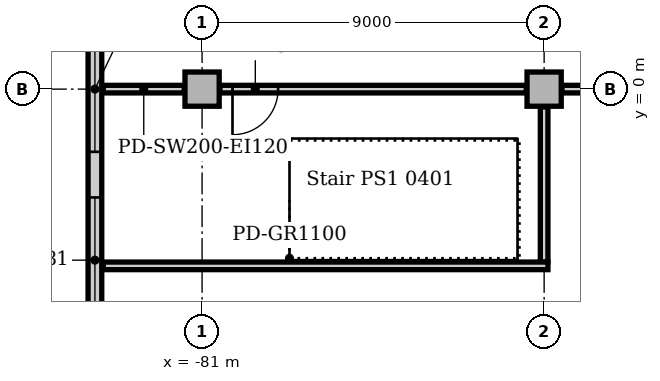
"""IFC4 building model, lengths in metres.
Left out: names, types, materials, properties, quantities, classifications, styles, units other than length and angle.
Written with IfcOpenShell. Run it as: python <this file> out.ifc"""

import sys

from ifc_helpers import new_model, si_unit, direction, frame, frame_2d, origin, origin_2d, place, context, subcontext, project, spatial, rectangle, extrude, element, fill, save


model = new_model("IFC4")
c1 = context("Model", 3, precision=1e-05, world=origin(), true_north=direction((0.0, 1.0)))
c2 = subcontext(c1, "Body", "Model", "MODEL_VIEW")
j1 = project(units=[si_unit("LENGTHUNIT", "METRE"), si_unit("PLANEANGLEUNIT", "RADIAN")], contexts=[c1])
p1 = place(None, origin())
s1 = spatial("IfcSite", under=j1, at=p1, CompositionType="ELEMENT")
p2 = place(p1, origin())
s2 = spatial("IfcBuilding", under=s1, at=p2, CompositionType="ELEMENT")
p3 = place(p2, frame((0.0, 0.0, 21.0)))
s3 = spatial("IfcBuildingStorey", under=s2, at=p3, CompositionType="ELEMENT", Elevation=21.0)
for number, where, z_axis, x_axis in (
    (1, (-81.0, 0.0, 0.0), (0.0, 0.0, 1.0), (1.0, 0.0, 0.0)),
    (2, (-72.0, 0.0, 0.0), (0.0, 0.0, 1.0), (1.0, 0.0, 0.0)),
):
    element("IfcColumn", number, at=place(p3, frame(where, z_axis=z_axis, x_axis=x_axis)), inside=s3, PredefinedType="COLUMN", context=c2, shape_type="SweptSolid", body=[
        extrude(rectangle(XDim=0.9, YDim=0.9, at=origin_2d()), origin(), (0.0, 0.0, 1.0), 4.7),
    ])
p4 = place(p3, frame((-83.82, 54.0, 0.0), z_axis=(0.0, 0.0, 1.0), x_axis=(0.0, -1.0, 0.0)))
e3 = element("IfcWall", 3, at=p4, inside=s3, PredefinedType="STANDARD", context=c2, shape_type="SweptSolid", body=[
    extrude(rectangle(XDim=63.0, YDim=0.36, at=frame_2d((31.5, 0.0))), origin(), (0.0, 0.0, 1.0), 4.85),
])
p5 = place(p4, frame((2.85, 0.0, 0.9)))
e4 = element("IfcOpeningElement", 4, at=p5, cuts=e3, PredefinedType="OPENING", context=c2, shape_type="SweptSolid", body=[
    extrude(rectangle(XDim=3.3, YDim=2.4, at=frame_2d((1.65, 1.2))), frame((0.0, 0.19, 0.0), z_axis=(0.0, -1.0, 0.0), x_axis=(1.0, 0.0, 0.0)), (0.0, 0.0, 1.0), 0.38),
])
p6 = place(p4, frame((7.35, 0.0, 0.9)))
e5 = element("IfcOpeningElement", 5, at=p6, cuts=e3, PredefinedType="OPENING", context=c2, shape_type="SweptSolid", body=[
    extrude(rectangle(XDim=3.3, YDim=2.4, at=frame_2d((1.65, 1.2))), frame((0.0, 0.19, 0.0), z_axis=(0.0, -1.0, 0.0), x_axis=(1.0, 0.0, 0.0)), (0.0, 0.0, 1.0), 0.38),
])
p7 = place(p4, frame((11.85, 0.0, 0.9)))
e6 = element("IfcOpeningElement", 6, at=p7, cuts=e3, PredefinedType="OPENING", context=c2, shape_type="SweptSolid", body=[
    extrude(rectangle(XDim=3.3, YDim=2.4, at=frame_2d((1.65, 1.2))), frame((0.0, 0.19, 0.0), z_axis=(0.0, -1.0, 0.0), x_axis=(1.0, 0.0, 0.0)), (0.0, 0.0, 1.0), 0.38),
])
p8 = place(p4, frame((16.35, 0.0, 0.9)))
e7 = element("IfcOpeningElement", 7, at=p8, cuts=e3, PredefinedType="OPENING", context=c2, shape_type="SweptSolid", body=[
    extrude(rectangle(XDim=3.3, YDim=2.4, at=frame_2d((1.65, 1.2))), frame((0.0, 0.19, 0.0), z_axis=(0.0, -1.0, 0.0), x_axis=(1.0, 0.0, 0.0)), (0.0, 0.0, 1.0), 0.38),
])
p9 = place(p4, frame((20.85, 0.0, 0.9)))
e8 = element("IfcOpeningElement", 8, at=p9, cuts=e3, PredefinedType="OPENING", context=c2, shape_type="SweptSolid", body=[
    extrude(rectangle(XDim=3.3, YDim=2.4, at=frame_2d((1.65, 1.2))), frame((0.0, 0.19, 0.0), z_axis=(0.0, -1.0, 0.0), x_axis=(1.0, 0.0, 0.0)), (0.0, 0.0, 1.0), 0.38),
])
p10 = place(p4, frame((25.35, 0.0, 0.9)))
e9 = element("IfcOpeningElement", 9, at=p10, cuts=e3, PredefinedType="OPENING", context=c2, shape_type="SweptSolid", body=[
    extrude(rectangle(XDim=3.3, YDim=2.4, at=frame_2d((1.65, 1.2))), frame((0.0, 0.19, 0.0), z_axis=(0.0, -1.0, 0.0), x_axis=(1.0, 0.0, 0.0)), (0.0, 0.0, 1.0), 0.38),
])
p11 = place(p4, frame((29.85, 0.0, 0.9)))
e10 = element("IfcOpeningElement", 10, at=p11, cuts=e3, PredefinedType="OPENING", context=c2, shape_type="SweptSolid", body=[
    extrude(rectangle(XDim=3.3, YDim=2.4, at=frame_2d((1.65, 1.2))), frame((0.0, 0.19, 0.0), z_axis=(0.0, -1.0, 0.0), x_axis=(1.0, 0.0, 0.0)), (0.0, 0.0, 1.0), 0.38),
])
p12 = place(p4, frame((34.35, 0.0, 0.9)))
e11 = element("IfcOpeningElement", 11, at=p12, cuts=e3, PredefinedType="OPENING", context=c2, shape_type="SweptSolid", body=[
    extrude(rectangle(XDim=3.3, YDim=2.4, at=frame_2d((1.65, 1.2))), frame((0.0, 0.19, 0.0), z_axis=(0.0, -1.0, 0.0), x_axis=(1.0, 0.0, 0.0)), (0.0, 0.0, 1.0), 0.38),
])
p13 = place(p4, frame((38.85, 0.0, 0.9)))
e12 = element("IfcOpeningElement", 12, at=p13, cuts=e3, PredefinedType="OPENING", context=c2, shape_type="SweptSolid", body=[
    extrude(rectangle(XDim=3.3, YDim=2.4, at=frame_2d((1.65, 1.2))), frame((0.0, 0.19, 0.0), z_axis=(0.0, -1.0, 0.0), x_axis=(1.0, 0.0, 0.0)), (0.0, 0.0, 1.0), 0.38),
])
p14 = place(p4, frame((43.35, 0.0, 0.9)))
e13 = element("IfcOpeningElement", 13, at=p14, cuts=e3, PredefinedType="OPENING", context=c2, shape_type="SweptSolid", body=[
    extrude(rectangle(XDim=3.3, YDim=2.4, at=frame_2d((1.65, 1.2))), frame((0.0, 0.19, 0.0), z_axis=(0.0, -1.0, 0.0), x_axis=(1.0, 0.0, 0.0)), (0.0, 0.0, 1.0), 0.38),
])
p15 = place(p4, frame((47.85, 0.0, 0.9)))
e14 = element("IfcOpeningElement", 14, at=p15, cuts=e3, PredefinedType="OPENING", context=c2, shape_type="SweptSolid", body=[
    extrude(rectangle(XDim=3.3, YDim=2.4, at=frame_2d((1.65, 1.2))), frame((0.0, 0.19, 0.0), z_axis=(0.0, -1.0, 0.0), x_axis=(1.0, 0.0, 0.0)), (0.0, 0.0, 1.0), 0.38),
])
p16 = place(p4, frame((52.35, 0.0, 0.9)))
e15 = element("IfcOpeningElement", 15, at=p16, cuts=e3, PredefinedType="OPENING", context=c2, shape_type="SweptSolid", body=[
    extrude(rectangle(XDim=3.3, YDim=2.4, at=frame_2d((1.65, 1.2))), frame((0.0, 0.19, 0.0), z_axis=(0.0, -1.0, 0.0), x_axis=(1.0, 0.0, 0.0)), (0.0, 0.0, 1.0), 0.38),
])
p17 = place(p4, frame((56.85, 0.0, 0.9)))
e16 = element("IfcOpeningElement", 16, at=p17, cuts=e3, PredefinedType="OPENING", context=c2, shape_type="SweptSolid", body=[
    extrude(rectangle(XDim=3.3, YDim=2.4, at=frame_2d((1.65, 1.2))), frame((0.0, 0.19, 0.0), z_axis=(0.0, -1.0, 0.0), x_axis=(1.0, 0.0, 0.0)), (0.0, 0.0, 1.0), 0.38),
])
p18 = place(p3, frame((-83.6, 0.0, 0.0), z_axis=(0.0, 0.0, 1.0), x_axis=(1.0, 0.0, 0.0)))
e17 = element("IfcWall", 17, at=p18, inside=s3, PredefinedType="SOLIDWALL", context=c2, shape_type="SweptSolid", body=[
    extrude(rectangle(XDim=2.13, YDim=0.2, at=frame_2d((1.065, 0.0))), origin(), (0.0, 0.0, 1.0), 4.7),
])
p19 = place(p3, frame((-80.53, 0.0, 0.0), z_axis=(0.0, 0.0, 1.0), x_axis=(1.0, 0.0, 0.0)))
e18 = element("IfcWall", 18, at=p19, inside=s3, PredefinedType="SOLIDWALL", context=c2, shape_type="SweptSolid", body=[
    extrude(rectangle(XDim=8.06, YDim=0.2, at=frame_2d((4.03, 0.0))), origin(), (0.0, 0.0, 1.0), 4.7),
])
p20 = place(p19, frame((0.33, 0.0, 0.0)))
e19 = element("IfcOpeningElement", 19, at=p20, cuts=e18, PredefinedType="OPENING", context=c2, shape_type="SweptSolid", body=[
    extrude(rectangle(XDim=1.2, YDim=2.1, at=frame_2d((0.6, 1.05))), frame((0.0, 0.11, 0.0), z_axis=(0.0, -1.0, 0.0), x_axis=(1.0, 0.0, 0.0)), (0.0, 0.0, 1.0), 0.22),
])
p21 = place(p3, frame((-72.0, -4.55, 0.0), z_axis=(0.0, 0.0, 1.0), x_axis=(0.0, 1.0, 0.0)))
e20 = element("IfcWall", 20, at=p21, inside=s3, PredefinedType="SOLIDWALL", context=c2, shape_type="SweptSolid", body=[
    extrude(rectangle(XDim=4.08, YDim=0.2, at=frame_2d((2.04, 0.0))), origin(), (0.0, 0.0, 1.0), 4.7),
])
p22 = place(p3, frame((-83.6, -4.65, 0.0), z_axis=(0.0, 0.0, 1.0), x_axis=(1.0, 0.0, 0.0)))
e21 = element("IfcWall", 21, at=p22, inside=s3, PredefinedType="SOLIDWALL", context=c2, shape_type="SweptSolid", body=[
    extrude(rectangle(XDim=11.7, YDim=0.2, at=frame_2d((5.85, 0.0))), origin(), (0.0, 0.0, 1.0), 4.7),
])
p23 = place(p3, frame((-71.53, 0.0, 0.0), z_axis=(0.0, 0.0, 1.0), x_axis=(1.0, 0.0, 0.0)))
e22 = element("IfcWall", 22, at=p23, inside=s3, PredefinedType="PARTITIONING", context=c2, shape_type="SweptSolid", body=[
    extrude(rectangle(XDim=8.53, YDim=0.2, at=frame_2d((4.265, 0.0))), origin(), (0.0, 0.0, 1.0), 4.7),
])
p24 = place(p23, frame((3.53, 0.0, 0.0)))
e23 = element("IfcOpeningElement", 23, at=p24, cuts=e22, PredefinedType="OPENING", context=c2, shape_type="SweptSolid", body=[
    extrude(rectangle(XDim=1.0, YDim=2.1, at=frame_2d((0.5, 1.05))), frame((0.0, 0.11, 0.0), z_axis=(0.0, -1.0, 0.0), x_axis=(1.0, 0.0, 0.0)), (0.0, 0.0, 1.0), 0.22),
])
p25 = place(p16, origin())
e24 = element("IfcWindow", 24, at=p25, inside=s3, PartitioningType="SINGLE_PANEL", PredefinedType="WINDOW", context=c2, shape_type="SweptSolid", body=[
    extrude(rectangle(XDim=3.3, YDim=2.4, at=frame_2d((1.65, 1.2))), frame((0.0, 0.13, 0.0), z_axis=(0.0, -1.0, 0.0), x_axis=(1.0, 0.0, 0.0)), (0.0, 0.0, 1.0), 0.06),
])
fill(e15, e24)
p26 = place(p17, origin())
e25 = element("IfcWindow", 25, at=p26, inside=s3, PartitioningType="SINGLE_PANEL", PredefinedType="WINDOW", context=c2, shape_type="SweptSolid", body=[
    extrude(rectangle(XDim=3.3, YDim=2.4, at=frame_2d((1.65, 1.2))), frame((0.0, 0.13, 0.0), z_axis=(0.0, -1.0, 0.0), x_axis=(1.0, 0.0, 0.0)), (0.0, 0.0, 1.0), 0.06),
])
fill(e16, e25)
p27 = place(p20, frame((1.2, 0.0, 0.0), z_axis=(0.0, 0.0, 1.0), x_axis=(-1.0, 0.0, 0.0)))
e26 = element("IfcDoor", 26, at=p27, inside=s3, OperationType="SINGLE_SWING_RIGHT", PredefinedType="DOOR", context=c2, shape_type="SweptSolid", body=[
    extrude(rectangle(XDim=1.2, YDim=2.1, at=frame_2d((0.6, 1.05))), frame((0.0, 0.025, 0.0), z_axis=(0.0, -1.0, 0.0), x_axis=(1.0, 0.0, 0.0)), (0.0, 0.0, 1.0), 0.05),
])
fill(e19, e26)
save(model, sys.argv[1])
